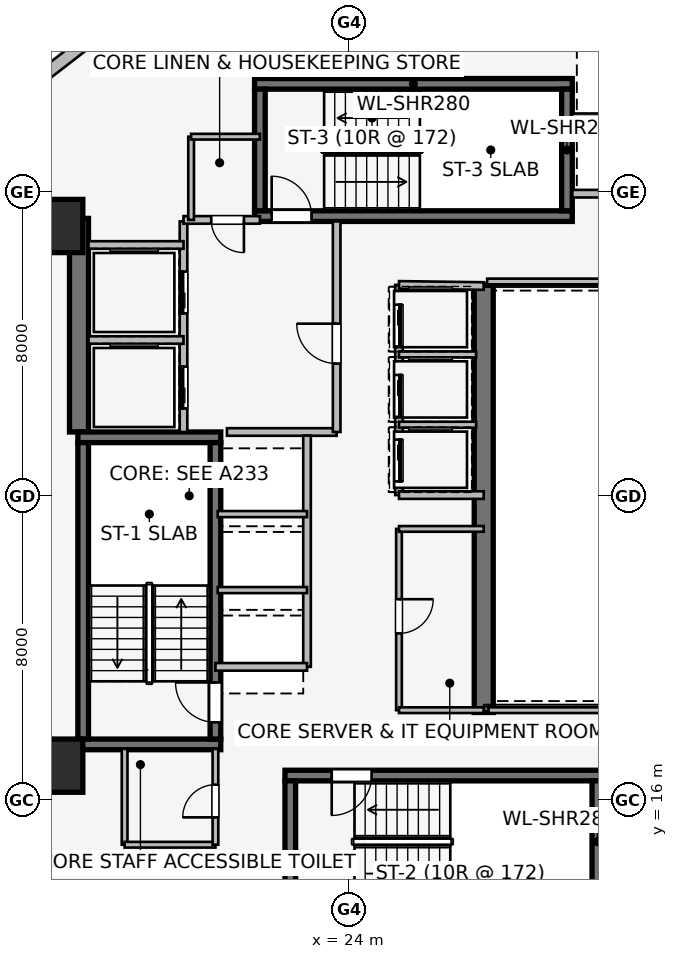
"""IFC4 building model, lengths in metres.
Left out: names, types, materials, properties, quantities, classifications, styles, units other than length and angle.
Written with IfcOpenShell. Run it as: python <this file> out.ifc"""

import sys

from ifc_helpers import new_model, si_unit, direction, frame, frame_2d, origin, origin_2d, place, context, subcontext, project, spatial, rectangle, extrude, element, fill, save


model = new_model("IFC4")
c1 = context("Model", 3, precision=1e-05, world=origin(), true_north=direction((0.0, 1.0)))
c2 = subcontext(c1, "Body", "Model", "MODEL_VIEW")
j1 = project(units=[si_unit("LENGTHUNIT", "METRE"), si_unit("PLANEANGLEUNIT", "RADIAN")], contexts=[c1])
p1 = place(None, origin())
s1 = spatial("IfcSite", under=j1, at=p1, CompositionType="ELEMENT")
p2 = place(p1, origin())
s2 = spatial("IfcBuilding", under=s1, at=p2, CompositionType="ELEMENT")
p3 = place(p2, frame((0.0, 0.0, 118.8)))
s3 = spatial("IfcBuildingStorey", under=s2, at=p3, CompositionType="ELEMENT", Elevation=118.8)
p4 = place(p3, frame((16.9, 25.68, 0.0), z_axis=(0.0, 0.0, 1.0), x_axis=(0.0, 1.0, 0.0)))
e1 = element("IfcWall", 1, at=p4, inside=s3, PredefinedType="SHEAR", context=c2, shape_type="SweptSolid", body=[
    extrude(rectangle(XDim=5.62, YDim=0.5, at=frame_2d((2.81, 0.0))), origin(), (0.0, 0.0, 1.0), 3.45),
])
p5 = place(p3, frame((27.55, 29.55, 0.0), z_axis=(0.0, 0.0, 1.0), x_axis=(0.0, -1.0, 0.0)))
e2 = element("IfcWall", 2, at=p5, inside=s3, PredefinedType="SHEAR", context=c2, shape_type="SweptSolid", body=[
    extrude(rectangle(XDim=11.25, YDim=0.5, at=frame_2d((5.625, 0.0))), origin(), (0.0, 0.0, 1.0), 3.45),
])
for number, where, z_axis, x_axis in (
    (3, (16.87, 17.46, 0.0), (0.0, 0.0, 1.0), (1.0, 0.0, 0.0)),
    (4, (20.63, 25.54, 0.0), (0.0, 0.0, 1.0), (-1.0, 0.0, 0.0)),
):
    element("IfcWall", number, at=place(p3, frame(where, z_axis=z_axis, x_axis=x_axis)), inside=s3, PredefinedType="SHEAR", context=c2, shape_type="SweptSolid", body=[
        extrude(rectangle(XDim=3.76, YDim=0.28, at=frame_2d((1.88, 0.0))), origin(), (0.0, 0.0, 1.0), 3.45),
    ])
p6 = place(p3, frame((17.01, 25.4, 0.0), z_axis=(0.0, 0.0, 1.0), x_axis=(0.0, -1.0, 0.0)))
e5 = element("IfcWall", 5, at=p6, inside=s3, PredefinedType="SHEAR", context=c2, shape_type="SweptSolid", body=[
    extrude(rectangle(XDim=7.8, YDim=0.28, at=frame_2d((3.9, 0.0))), origin(), (0.0, 0.0, 1.0), 3.45),
])
p7 = place(p3, frame((20.49, 17.6, 0.0), z_axis=(0.0, 0.0, 1.0), x_axis=(0.0, 1.0, 0.0)))
e6 = element("IfcWall", 6, at=p7, inside=s3, PredefinedType="SHEAR", context=c2, shape_type="SweptSolid", body=[
    extrude(rectangle(XDim=7.8, YDim=0.28, at=frame_2d((3.9, 0.0))), origin(), (0.0, 0.0, 1.0), 3.45),
])
p8 = place(p7, frame((0.44, 0.0, 0.0)))
e7 = element("IfcOpeningElement", 7, at=p8, cuts=e6, PredefinedType="OPENING", context=c2, shape_type="SweptSolid", body=[
    extrude(rectangle(XDim=1.05, YDim=2.0, at=frame_2d((0.525, 1.0))), frame((0.0, 0.15, 0.0), z_axis=(0.0, -1.0, 0.0), x_axis=(1.0, 0.0, 0.0)), (0.0, 0.0, 1.0), 0.3),
])
p9 = place(p3, frame((30.68, 16.64, 0.0), z_axis=(0.0, 0.0, 1.0), x_axis=(-1.0, 0.0, 0.0)))
e8 = element("IfcWall", 8, at=p9, inside=s3, PredefinedType="SHEAR", context=c2, shape_type="SweptSolid", body=[
    extrude(rectangle(XDim=8.36, YDim=0.28, at=frame_2d((4.18, 0.0))), origin(), (0.0, 0.0, 1.0), 3.45),
])
p10 = place(p9, frame((6.08, 0.0, 0.0)))
e9 = element("IfcOpeningElement", 9, at=p10, cuts=e8, PredefinedType="OPENING", context=c2, shape_type="SweptSolid", body=[
    extrude(rectangle(XDim=1.05, YDim=2.0, at=frame_2d((0.525, 1.0))), frame((0.0, 0.15, 0.0), z_axis=(0.0, -1.0, 0.0), x_axis=(1.0, 0.0, 0.0)), (0.0, 0.0, 1.0), 0.3),
])
for number, where, z_axis, x_axis in (
    (10, (22.46, 16.5, 0.0), (0.0, 0.0, 1.0), (0.0, -1.0, 0.0)),
    (11, (30.54, 13.3, 0.0), (0.0, 0.0, 1.0), (0.0, 1.0, 0.0)),
):
    element("IfcWall", number, at=place(p3, frame(where, z_axis=z_axis, x_axis=x_axis)), inside=s3, PredefinedType="SHEAR", context=c2, shape_type="SweptSolid", body=[
        extrude(rectangle(XDim=3.2, YDim=0.28, at=frame_2d((1.6, 0.0))), origin(), (0.0, 0.0, 1.0), 3.45),
    ])
p11 = place(p3, frame((21.52, 31.36, 0.0), z_axis=(0.0, 0.0, 1.0), x_axis=(1.0, 0.0, 0.0)))
e12 = element("IfcWall", 12, at=p11, inside=s3, PredefinedType="SHEAR", context=c2, shape_type="SweptSolid", body=[
    extrude(rectangle(XDim=8.36, YDim=0.28, at=frame_2d((4.18, 0.0))), origin(), (0.0, 0.0, 1.0), 3.45),
])
p12 = place(p11, frame((0.45, 0.0, 0.0)))
e13 = element("IfcOpeningElement", 13, at=p12, cuts=e12, PredefinedType="OPENING", context=c2, shape_type="SweptSolid", body=[
    extrude(rectangle(XDim=1.05, YDim=2.0, at=frame_2d((0.525, 1.0))), frame((0.0, 0.15, 0.0), z_axis=(0.0, -1.0, 0.0), x_axis=(1.0, 0.0, 0.0)), (0.0, 0.0, 1.0), 0.3),
])
p13 = place(p3, frame((29.88, 34.84, 0.0), z_axis=(0.0, 0.0, 1.0), x_axis=(-1.0, 0.0, 0.0)))
e14 = element("IfcWall", 14, at=p13, inside=s3, PredefinedType="SHEAR", context=c2, shape_type="SweptSolid", body=[
    extrude(rectangle(XDim=8.36, YDim=0.28, at=frame_2d((4.18, 0.0))), origin(), (0.0, 0.0, 1.0), 3.45),
])
for number, where, z_axis, x_axis in (
    (15, (21.66, 34.7, 0.0), (0.0, 0.0, 1.0), (0.0, -1.0, 0.0)),
    (16, (29.74, 31.5, 0.0), (0.0, 0.0, 1.0), (0.0, 1.0, 0.0)),
):
    element("IfcWall", number, at=place(p3, frame(where, z_axis=z_axis, x_axis=x_axis)), inside=s3, PredefinedType="SHEAR", context=c2, shape_type="SweptSolid", body=[
        extrude(rectangle(XDim=3.2, YDim=0.28, at=frame_2d((1.6, 0.0))), origin(), (0.0, 0.0, 1.0), 3.45),
    ])
for number, where, z_axis, x_axis in (
    (17, (16.3, 16.9, 0.0), (0.0, 0.0, 1.0), (1.0, 0.0, 0.0)),
    (18, (16.3, 31.1, 0.0), (0.0, 0.0, 1.0), (1.0, 0.0, 0.0)),
):
    element("IfcColumn", number, at=place(p3, frame(where, z_axis=z_axis, x_axis=x_axis)), inside=s3, PredefinedType="COLUMN", context=c2, shape_type="SweptSolid", body=[
        extrude(rectangle(XDim=1.4, YDim=1.4, at=origin_2d()), origin(), (0.0, 0.0, 1.0), 3.45),
    ])
p14 = place(p3, frame((15.918, 35.024, 0.0), z_axis=(0.0, 0.0, 1.0), x_axis=(0.790621329885, 0.612305408053, 0.0)))
e19 = element("IfcWall", 19, at=p14, inside=s3, PredefinedType="STANDARD", context=c2, shape_type="SweptSolid", body=[
    extrude(rectangle(XDim=1.676, YDim=0.33, at=frame_2d((0.838, 0.0))), origin(), (0.0, 0.0, 1.0), 3.19),
])
p15 = place(p3, frame((19.65, 25.68, 0.0), z_axis=(0.0, 0.0, 1.0), x_axis=(0.0, 1.0, 0.0)))
e20 = element("IfcWall", 20, at=p15, inside=s3, PredefinedType="PARTITIONING", context=c2, shape_type="SweptSolid", body=[
    extrude(rectangle(XDim=5.54, YDim=0.2, at=frame_2d((2.77, 0.0))), origin(), (0.0, 0.0, 1.0), 3.19),
])
p16 = place(p15, frame((0.62, 0.0, 0.0)))
e21 = element("IfcOpeningElement", 21, at=p16, cuts=e20, PredefinedType="OPENING", context=c2, shape_type="SweptSolid", body=[
    extrude(rectangle(XDim=1.1, YDim=2.2, at=frame_2d((0.55, 1.1))), frame((0.0, 0.11, 0.0), z_axis=(0.0, -1.0, 0.0), x_axis=(1.0, 0.0, 0.0)), (0.0, 0.0, 1.0), 0.22),
])
p17 = place(p15, frame((3.12, 0.0, 0.0)))
e22 = element("IfcOpeningElement", 22, at=p17, cuts=e20, PredefinedType="OPENING", context=c2, shape_type="SweptSolid", body=[
    extrude(rectangle(XDim=1.1, YDim=2.2, at=frame_2d((0.55, 1.1))), frame((0.0, 0.11, 0.0), z_axis=(0.0, -1.0, 0.0), x_axis=(1.0, 0.0, 0.0)), (0.0, 0.0, 1.0), 0.22),
])
p18 = place(p3, frame((20.793, 25.68, 0.0), z_axis=(0.0, 0.0, 1.0), x_axis=(1.0, 0.0, 0.0)))
e23 = element("IfcWall", 23, at=p18, inside=s3, PredefinedType="PARTITIONING", context=c2, shape_type="SweptSolid", body=[
    extrude(rectangle(XDim=2.887, YDim=0.2, at=frame_2d((1.443, 0.0))), origin(), (0.0, 0.0, 1.0), 3.19),
])
p19 = place(p3, frame((23.68, 25.68, 0.0), z_axis=(0.0, 0.0, 1.0), x_axis=(0.0, 1.0, 0.0)))
e24 = element("IfcWall", 24, at=p19, inside=s3, PredefinedType="PARTITIONING", context=c2, shape_type="SweptSolid", body=[
    extrude(rectangle(XDim=5.54, YDim=0.2, at=frame_2d((2.77, 0.0))), origin(), (0.0, 0.0, 1.0), 3.19),
])
p20 = place(p19, frame((1.8, 0.0, 0.0)))
e25 = element("IfcOpeningElement", 25, at=p20, cuts=e24, PredefinedType="OPENING", context=c2, shape_type="SweptSolid", body=[
    extrude(rectangle(XDim=1.05, YDim=2.0, at=frame_2d((0.525, 1.0))), frame((0.0, 0.11, 0.0), z_axis=(0.0, -1.0, 0.0), x_axis=(1.0, 0.0, 0.0)), (0.0, 0.0, 1.0), 0.22),
])
p21 = place(p3, frame((21.66, 31.26, 0.0), z_axis=(0.0, 0.0, 1.0), x_axis=(-1.0, 0.0, 0.0)))
e26 = element("IfcWall", 26, at=p21, inside=s3, PredefinedType="PARTITIONING", context=c2, shape_type="SweptSolid", body=[
    extrude(rectangle(XDim=2.01, YDim=0.2, at=frame_2d((1.005, 0.0))), origin(), (0.0, 0.0, 1.0), 3.19),
])
p22 = place(p21, frame((0.42, 0.0, 0.0)))
e27 = element("IfcOpeningElement", 27, at=p22, cuts=e26, PredefinedType="OPENING", context=c2, shape_type="SweptSolid", body=[
    extrude(rectangle(XDim=0.86, YDim=2.0, at=frame_2d((0.43, 1.0))), frame((0.0, 0.11, 0.0), z_axis=(0.0, -1.0, 0.0), x_axis=(1.0, 0.0, 0.0)), (0.0, 0.0, 1.0), 0.22),
])
p23 = place(p3, frame((17.15, 28.1, 0.0), z_axis=(0.0, 0.0, 1.0), x_axis=(1.0, 0.0, 0.0)))
e28 = element("IfcWall", 28, at=p23, inside=s3, PredefinedType="PARTITIONING", context=c2, shape_type="SweptSolid", body=[
    extrude(rectangle(XDim=2.5, YDim=0.2, at=frame_2d((1.25, 0.0))), origin(), (0.0, 0.0, 1.0), 3.19),
])
p24 = place(p3, frame((19.65, 30.6, 0.0), z_axis=(0.0, 0.0, 1.0), x_axis=(-1.0, 0.0, 0.0)))
e29 = element("IfcWall", 29, at=p24, inside=s3, PredefinedType="PARTITIONING", context=c2, shape_type="SweptSolid", body=[
    extrude(rectangle(XDim=2.5, YDim=0.2, at=frame_2d((1.25, 0.0))), origin(), (0.0, 0.0, 1.0), 2.09),
])
p25 = place(p3, frame((32.48, 31.95, 0.0), z_axis=(0.0, 0.0, 1.0), x_axis=(-1.0, 0.0, 0.0)))
e30 = element("IfcWall", 30, at=p25, inside=s3, PredefinedType="PARTITIONING", context=c2, shape_type="SweptSolid", body=[
    extrude(rectangle(XDim=2.6, YDim=0.2, at=frame_2d((1.3, 0.0))), origin(), (0.0, 0.0, 1.0), 3.19),
])
p26 = place(p3, frame((29.875, 33.98, 0.0), z_axis=(0.0, 0.0, 1.0), x_axis=(1.0, 0.0, 0.0)))
e31 = element("IfcWall", 31, at=p26, inside=s3, PredefinedType="PARTITIONING", context=c2, shape_type="SweptSolid", body=[
    extrude(rectangle(XDim=2.605, YDim=0.16, at=frame_2d((1.302, 0.0))), origin(), (0.0, 0.0, 1.0), 3.19),
])
p27 = place(p3, frame((22.9, 19.5, 0.0), z_axis=(0.0, 0.0, 1.0), x_axis=(0.0, 1.0, 0.0)))
e32 = element("IfcWall", 32, at=p27, inside=s3, PredefinedType="PARTITIONING", context=c2, shape_type="SweptSolid", body=[
    extrude(rectangle(XDim=6.085, YDim=0.2, at=frame_2d((3.042, 0.0))), origin(), (0.0, 0.0, 1.0), 3.19),
])
p28 = place(p3, frame((20.49, 19.5, 0.0), z_axis=(0.0, 0.0, 1.0), x_axis=(1.0, 0.0, 0.0)))
e33 = element("IfcWall", 33, at=p28, inside=s3, PredefinedType="PARTITIONING", context=c2, shape_type="SweptSolid", body=[
    extrude(rectangle(XDim=2.41, YDim=0.2, at=frame_2d((1.205, 0.0))), origin(), (0.0, 0.0, 1.0), 2.09),
])
for number, where, z_axis, x_axis in (
    (34, (20.55, 21.52, 0.0), (0.0, 0.0, 1.0), (1.0, 0.0, 0.0)),
    (35, (20.55, 23.52, 0.0), (0.0, 0.0, 1.0), (1.0, 0.0, 0.0)),
):
    element("IfcWall", number, at=place(p3, frame(where, z_axis=z_axis, x_axis=x_axis)), inside=s3, PredefinedType="PARTITIONING", context=c2, shape_type="SweptSolid", body=[
        extrude(rectangle(XDim=2.35, YDim=0.16, at=frame_2d((1.175, 0.0))), origin(), (0.0, 0.0, 1.0), 3.19),
    ])
p29 = place(p3, frame((25.32, 29.55, 0.0), z_axis=(0.0, 0.0, 1.0), x_axis=(0.0, -1.0, 0.0)))
e36 = element("IfcWall", 36, at=p29, inside=s3, PredefinedType="PARTITIONING", context=c2, shape_type="SweptSolid", body=[
    extrude(rectangle(XDim=5.53, YDim=0.2, at=frame_2d((2.765, 0.0))), origin(), (0.0, 0.0, 1.0), 3.19),
])
p30 = place(p29, frame((0.52, 0.0, 0.0)))
e37 = element("IfcOpeningElement", 37, at=p30, cuts=e36, PredefinedType="OPENING", context=c2, shape_type="SweptSolid", body=[
    extrude(rectangle(XDim=1.1, YDim=2.2, at=frame_2d((0.55, 1.1))), frame((0.0, 0.11, 0.0), z_axis=(0.0, -1.0, 0.0), x_axis=(1.0, 0.0, 0.0)), (0.0, 0.0, 1.0), 0.22),
])
p31 = place(p29, frame((2.37, 0.0, 0.0)))
e38 = element("IfcOpeningElement", 38, at=p31, cuts=e36, PredefinedType="OPENING", context=c2, shape_type="SweptSolid", body=[
    extrude(rectangle(XDim=1.1, YDim=2.2, at=frame_2d((0.55, 1.1))), frame((0.0, 0.11, 0.0), z_axis=(0.0, -1.0, 0.0), x_axis=(1.0, 0.0, 0.0)), (0.0, 0.0, 1.0), 0.22),
])
p32 = place(p29, frame((4.07, 0.0, 0.0)))
e39 = element("IfcOpeningElement", 39, at=p32, cuts=e36, PredefinedType="OPENING", context=c2, shape_type="SweptSolid", body=[
    extrude(rectangle(XDim=1.1, YDim=2.2, at=frame_2d((0.55, 1.1))), frame((0.0, 0.11, 0.0), z_axis=(0.0, -1.0, 0.0), x_axis=(1.0, 0.0, 0.0)), (0.0, 0.0, 1.0), 0.22),
])
p33 = place(p3, frame((27.55, 29.52, 0.0), z_axis=(0.0, 0.0, 1.0), x_axis=(-0.999909343457, 0.013464949556, 0.0)))
e40 = element("IfcWall", 40, at=p33, inside=s3, PredefinedType="PARTITIONING", context=c2, shape_type="SweptSolid", body=[
    extrude(rectangle(XDim=2.23, YDim=0.2, at=frame_2d((1.115, 0.0))), origin(), (0.0, 0.0, 1.0), 2.09),
])
p34 = place(p3, frame((25.32, 24.02, 0.0), z_axis=(0.0, 0.0, 1.0), x_axis=(1.0, 0.0, 0.0)))
e41 = element("IfcWall", 41, at=p34, inside=s3, PredefinedType="PARTITIONING", context=c2, shape_type="SweptSolid", body=[
    extrude(rectangle(XDim=2.23, YDim=0.2, at=frame_2d((1.115, 0.0))), origin(), (0.0, 0.0, 1.0), 3.19),
])
for number, where, z_axis, x_axis in (
    (42, (25.32, 25.87, 0.0), (0.0, 0.0, 1.0), (1.0, 0.0, 0.0)),
    (43, (25.32, 27.72, 0.0), (0.0, 0.0, 1.0), (1.0, 0.0, 0.0)),
):
    element("IfcWall", number, at=place(p3, frame(where, z_axis=z_axis, x_axis=x_axis)), inside=s3, PredefinedType="PARTITIONING", context=c2, shape_type="SweptSolid", body=[
        extrude(rectangle(XDim=2.03, YDim=0.16, at=frame_2d((1.015, 0.0))), origin(), (0.0, 0.0, 1.0), 3.19),
    ])
p35 = place(p3, frame((25.32, 23.13, 0.0), z_axis=(0.0, 0.0, 1.0), x_axis=(0.0, -1.0, 0.0)))
e44 = element("IfcWall", 44, at=p35, inside=s3, PredefinedType="PARTITIONING", context=c2, shape_type="SweptSolid", body=[
    extrude(rectangle(XDim=4.77, YDim=0.15, at=frame_2d((2.385, 0.0))), origin(), (0.0, 0.0, 1.0), 3.19),
])
p36 = place(p35, frame((1.85, 0.0, 0.0)))
e45 = element("IfcOpeningElement", 45, at=p36, cuts=e44, PredefinedType="OPENING", context=c2, shape_type="SweptSolid", body=[
    extrude(rectangle(XDim=0.9, YDim=2.0, at=frame_2d((0.45, 1.0))), frame((0.0, 0.085, 0.0), z_axis=(0.0, -1.0, 0.0), x_axis=(1.0, 0.0, 0.0)), (0.0, 0.0, 1.0), 0.17),
])
for number, where, z_axis, x_axis in (
    (46, (25.32, 23.13, 0.0), (0.0, 0.0, 1.0), (1.0, 0.0, 0.0)),
    (47, (25.32, 18.36, 0.0), (0.0, 0.0, 1.0), (1.0, 0.0, 0.0)),
):
    element("IfcWall", number, at=place(p3, frame(where, z_axis=z_axis, x_axis=x_axis)), inside=s3, PredefinedType="PARTITIONING", context=c2, shape_type="SweptSolid", body=[
        extrude(rectangle(XDim=2.23, YDim=0.15, at=frame_2d((1.115, 0.0))), origin(), (0.0, 0.0, 1.0), 3.19),
    ])
p37 = place(p3, frame((18.1, 17.34, 0.0), z_axis=(0.0, 0.0, 1.0), x_axis=(0.0, -1.0, 0.0)))
e48 = element("IfcWall", 48, at=p37, inside=s3, PredefinedType="PARTITIONING", context=c2, shape_type="SweptSolid", body=[
    extrude(rectangle(XDim=2.52, YDim=0.15, at=frame_2d((1.26, 0.0))), origin(), (0.0, 0.0, 1.0), 3.19),
])
p38 = place(p3, frame((18.1, 14.82, 0.0), z_axis=(0.0, 0.0, 1.0), x_axis=(1.0, 0.0, 0.0)))
e49 = element("IfcWall", 49, at=p38, inside=s3, PredefinedType="PARTITIONING", context=c2, shape_type="SweptSolid", body=[
    extrude(rectangle(XDim=2.39, YDim=0.15, at=frame_2d((1.195, 0.0))), origin(), (0.0, 0.0, 1.0), 3.19),
])
p39 = place(p3, frame((20.49, 14.82, 0.0), z_axis=(0.0, 0.0, 1.0), x_axis=(0.0, 1.0, 0.0)))
e50 = element("IfcWall", 50, at=p39, inside=s3, PredefinedType="PARTITIONING", context=c2, shape_type="SweptSolid", body=[
    extrude(rectangle(XDim=2.52, YDim=0.15, at=frame_2d((1.26, 0.0))), origin(), (0.0, 0.0, 1.0), 3.19),
])
p40 = place(p39, frame((0.72, 0.0, 0.0)))
e51 = element("IfcOpeningElement", 51, at=p40, cuts=e50, PredefinedType="OPENING", context=c2, shape_type="SweptSolid", body=[
    extrude(rectangle(XDim=0.86, YDim=2.0, at=frame_2d((0.43, 1.0))), frame((0.0, 0.085, 0.0), z_axis=(0.0, -1.0, 0.0), x_axis=(1.0, 0.0, 0.0)), (0.0, 0.0, 1.0), 0.17),
])
p41 = place(p3, frame((19.85, 33.45, 0.0), z_axis=(0.0, 0.0, 1.0), x_axis=(0.0, -1.0, 0.0)))
e52 = element("IfcWall", 52, at=p41, inside=s3, PredefinedType="PARTITIONING", context=c2, shape_type="SweptSolid", body=[
    extrude(rectangle(XDim=2.19, YDim=0.15, at=frame_2d((1.095, 0.0))), origin(), (0.0, 0.0, 1.0), 3.19),
])
p42 = place(p3, frame((21.66, 33.45, 0.0), z_axis=(0.0, 0.0, 1.0), x_axis=(-1.0, 0.0, 0.0)))
e53 = element("IfcWall", 53, at=p42, inside=s3, PredefinedType="PARTITIONING", context=c2, shape_type="SweptSolid", body=[
    extrude(rectangle(XDim=1.81, YDim=0.15, at=frame_2d((0.905, 0.0))), origin(), (0.0, 0.0, 1.0), 3.19),
])
p43 = place(p3, frame((27.675, 18.36, 0.0), z_axis=(0.0, 0.0, 1.0), x_axis=(1.0, 0.0, 0.0)))
e54 = element("IfcWall", 54, at=p43, inside=s3, PredefinedType="PARTITIONING", context=c2, shape_type="SweptSolid", body=[
    extrude(rectangle(XDim=12.165, YDim=0.15, at=frame_2d((6.083, 0.0))), origin(), (0.0, 0.0, 1.0), 2.331),
])
p44 = place(p3, frame((39.84, 29.64, 0.0), z_axis=(0.0, 0.0, 1.0), x_axis=(-1.0, 0.0, 0.0)))
e55 = element("IfcWall", 55, at=p44, inside=s3, PredefinedType="PARTITIONING", context=c2, shape_type="SweptSolid", body=[
    extrude(rectangle(XDim=12.2, YDim=0.15, at=frame_2d((6.1, 0.0))), origin(), (0.0, 0.0, 1.0), 2.331),
])
p45 = place(p8, origin())
e56 = element("IfcDoor", 56, at=p45, inside=s3, OperationType="SINGLE_SWING_RIGHT", PredefinedType="DOOR", context=c2, shape_type="SweptSolid", body=[
    extrude(rectangle(XDim=1.05, YDim=2.0, at=frame_2d((0.525, 1.0))), frame((0.0, 0.025, 0.0), z_axis=(0.0, -1.0, 0.0), x_axis=(1.0, 0.0, 0.0)), (0.0, 0.0, 1.0), 0.05),
])
fill(e7, e56)
p46 = place(p10, origin())
e57 = element("IfcDoor", 57, at=p46, inside=s3, OperationType="SINGLE_SWING_RIGHT", PredefinedType="DOOR", context=c2, shape_type="SweptSolid", body=[
    extrude(rectangle(XDim=1.05, YDim=2.0, at=frame_2d((0.525, 1.0))), frame((0.0, 0.025, 0.0), z_axis=(0.0, -1.0, 0.0), x_axis=(1.0, 0.0, 0.0)), (0.0, 0.0, 1.0), 0.05),
])
fill(e9, e57)
p47 = place(p12, origin())
e58 = element("IfcDoor", 58, at=p47, inside=s3, OperationType="SINGLE_SWING_LEFT", PredefinedType="DOOR", context=c2, shape_type="SweptSolid", body=[
    extrude(rectangle(XDim=1.05, YDim=2.0, at=frame_2d((0.525, 1.0))), frame((0.0, 0.025, 0.0), z_axis=(0.0, -1.0, 0.0), x_axis=(1.0, 0.0, 0.0)), (0.0, 0.0, 1.0), 0.05),
])
fill(e13, e58)
p48 = place(p16, origin())
e59 = element("IfcDoor", 59, at=p48, inside=s3, OperationType="SLIDING_TO_LEFT", PredefinedType="DOOR", context=c2, shape_type="SweptSolid", body=[
    extrude(rectangle(XDim=1.1, YDim=2.2, at=frame_2d((0.55, 1.1))), frame((0.0, 0.025, 0.0), z_axis=(0.0, -1.0, 0.0), x_axis=(1.0, 0.0, 0.0)), (0.0, 0.0, 1.0), 0.05),
])
fill(e21, e59)
p49 = place(p17, origin())
e60 = element("IfcDoor", 60, at=p49, inside=s3, OperationType="SLIDING_TO_LEFT", PredefinedType="DOOR", context=c2, shape_type="SweptSolid", body=[
    extrude(rectangle(XDim=1.1, YDim=2.2, at=frame_2d((0.55, 1.1))), frame((0.0, 0.025, 0.0), z_axis=(0.0, -1.0, 0.0), x_axis=(1.0, 0.0, 0.0)), (0.0, 0.0, 1.0), 0.05),
])
fill(e22, e60)
p50 = place(p20, origin())
e61 = element("IfcDoor", 61, at=p50, inside=s3, OperationType="SINGLE_SWING_RIGHT", PredefinedType="DOOR", context=c2, shape_type="SweptSolid", body=[
    extrude(rectangle(XDim=1.05, YDim=2.0, at=frame_2d((0.525, 1.0))), frame((0.0, 0.025, 0.0), z_axis=(0.0, -1.0, 0.0), x_axis=(1.0, 0.0, 0.0)), (0.0, 0.0, 1.0), 0.05),
])
fill(e25, e61)
p51 = place(p22, origin())
e62 = element("IfcDoor", 62, at=p51, inside=s3, OperationType="SINGLE_SWING_LEFT", PredefinedType="DOOR", context=c2, shape_type="SweptSolid", body=[
    extrude(rectangle(XDim=0.86, YDim=2.0, at=frame_2d((0.43, 1.0))), frame((0.0, 0.025, 0.0), z_axis=(0.0, -1.0, 0.0), x_axis=(1.0, 0.0, 0.0)), (0.0, 0.0, 1.0), 0.05),
])
fill(e27, e62)
p52 = place(p30, origin())
e63 = element("IfcDoor", 63, at=p52, inside=s3, OperationType="SLIDING_TO_LEFT", PredefinedType="DOOR", context=c2, shape_type="SweptSolid", body=[
    extrude(rectangle(XDim=1.1, YDim=2.2, at=frame_2d((0.55, 1.1))), frame((0.0, 0.025, 0.0), z_axis=(0.0, -1.0, 0.0), x_axis=(1.0, 0.0, 0.0)), (0.0, 0.0, 1.0), 0.05),
])
fill(e37, e63)
p53 = place(p31, origin())
e64 = element("IfcDoor", 64, at=p53, inside=s3, OperationType="SLIDING_TO_LEFT", PredefinedType="DOOR", context=c2, shape_type="SweptSolid", body=[
    extrude(rectangle(XDim=1.1, YDim=2.2, at=frame_2d((0.55, 1.1))), frame((0.0, 0.025, 0.0), z_axis=(0.0, -1.0, 0.0), x_axis=(1.0, 0.0, 0.0)), (0.0, 0.0, 1.0), 0.05),
])
fill(e38, e64)
p54 = place(p32, origin())
e65 = element("IfcDoor", 65, at=p54, inside=s3, OperationType="SLIDING_TO_LEFT", PredefinedType="DOOR", context=c2, shape_type="SweptSolid", body=[
    extrude(rectangle(XDim=1.1, YDim=2.2, at=frame_2d((0.55, 1.1))), frame((0.0, 0.025, 0.0), z_axis=(0.0, -1.0, 0.0), x_axis=(1.0, 0.0, 0.0)), (0.0, 0.0, 1.0), 0.05),
])
fill(e39, e65)
p55 = place(p36, origin())
e66 = element("IfcDoor", 66, at=p55, inside=s3, OperationType="SINGLE_SWING_LEFT", PredefinedType="DOOR", context=c2, shape_type="SweptSolid", body=[
    extrude(rectangle(XDim=0.9, YDim=2.0, at=frame_2d((0.45, 1.0))), frame((0.0, 0.025, 0.0), z_axis=(0.0, -1.0, 0.0), x_axis=(1.0, 0.0, 0.0)), (0.0, 0.0, 1.0), 0.05),
])
fill(e45, e66)
p56 = place(p40, origin())
e67 = element("IfcDoor", 67, at=p56, inside=s3, OperationType="SINGLE_SWING_LEFT", PredefinedType="DOOR", context=c2, shape_type="SweptSolid", body=[
    extrude(rectangle(XDim=0.86, YDim=2.0, at=frame_2d((0.43, 1.0))), frame((0.0, 0.025, 0.0), z_axis=(0.0, -1.0, 0.0), x_axis=(1.0, 0.0, 0.0)), (0.0, 0.0, 1.0), 0.05),
])
fill(e51, e67)
save(model, sys.argv[1])
